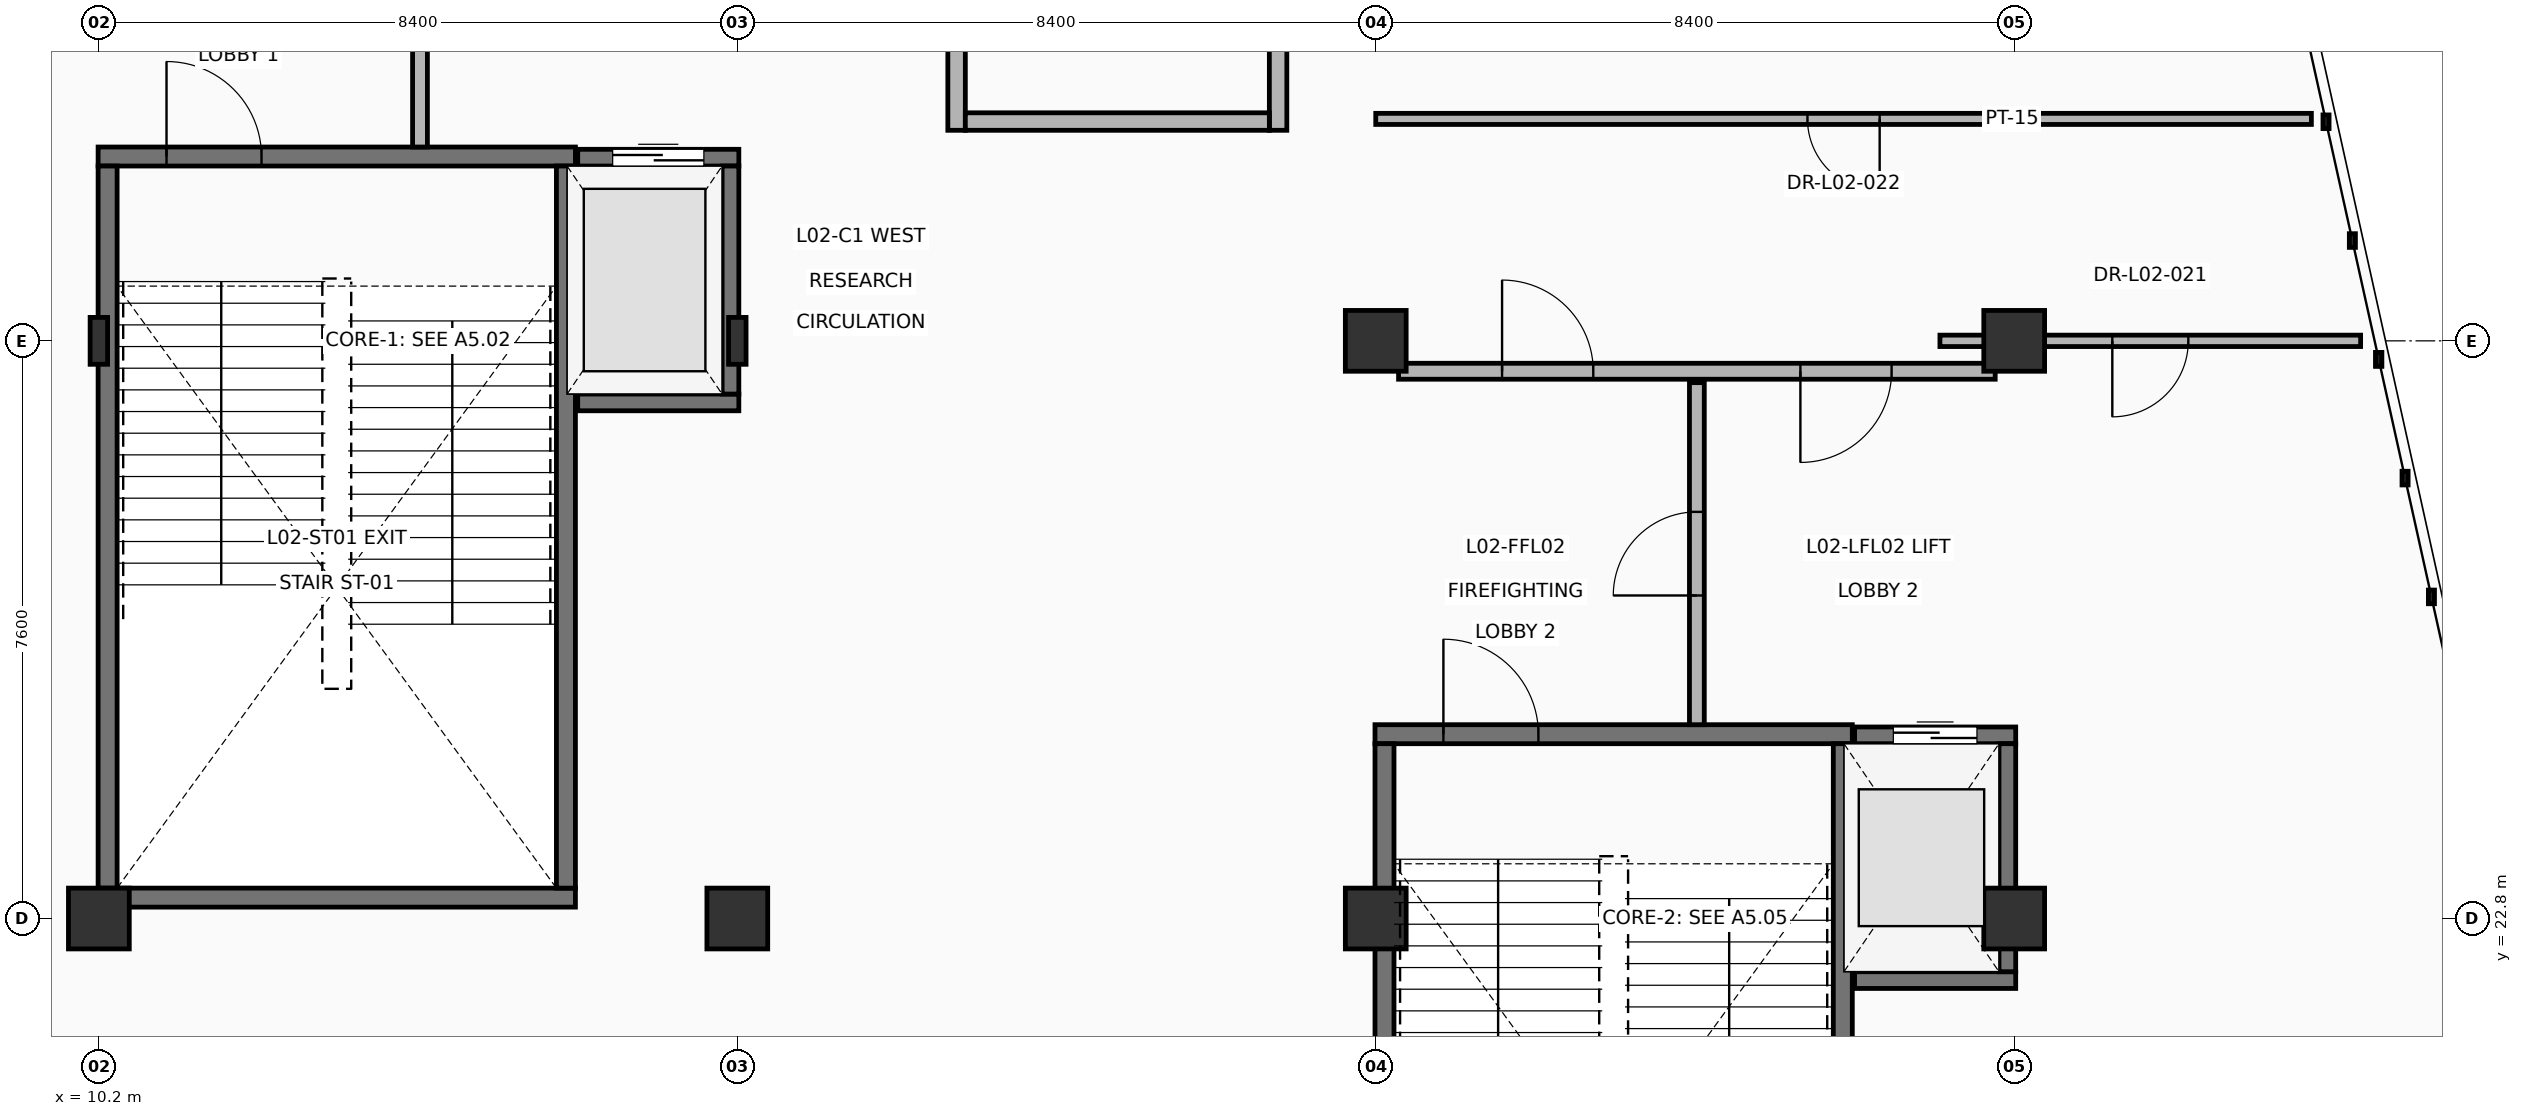
"""IFC4 building model, lengths in metres.
Left out: names, types, materials, properties, quantities, classifications, styles, units other than length and angle.
Written with IfcOpenShell. Run it as: python <this file> out.ifc"""

import sys

from ifc_helpers import new_model, si_unit, direction, frame, frame_2d, origin, origin_2d, place, context, subcontext, project, spatial, rectangle, i_section, extrude, element, fill, save


model = new_model("IFC4")
c1 = context("Model", 3, precision=1e-05, world=origin(), true_north=direction((0.0, 1.0)))
c2 = subcontext(c1, "Body", "Model", "MODEL_VIEW")
j1 = project(units=[si_unit("LENGTHUNIT", "METRE"), si_unit("PLANEANGLEUNIT", "RADIAN")], contexts=[c1])
p1 = place(None, origin())
s1 = spatial("IfcSite", under=j1, at=p1, CompositionType="ELEMENT")
p2 = place(p1, origin())
s2 = spatial("IfcBuilding", under=s1, at=p2, CompositionType="ELEMENT")
p3 = place(p2, frame((0.0, 0.0, 5.4)))
s3 = spatial("IfcBuildingStorey", under=s2, at=p3, CompositionType="ELEMENT", Elevation=5.4)
p4 = place(p3, frame((10.2, 22.8, 0.0), z_axis=(0.0, 0.0, 1.0), x_axis=(1.0, 0.0, 0.0)))
e1 = element("IfcColumn", 1, at=p4, inside=s3, PredefinedType="COLUMN", context=c2, shape_type="SweptSolid", body=[
    extrude(rectangle(XDim=0.8, YDim=0.8, at=origin_2d()), origin(), (0.0, 0.0, 1.0), 5.1),
])
p5 = place(p3, frame((10.2, 30.4, 0.0), z_axis=(0.0, 0.0, 1.0), x_axis=(1.0, 0.0, 0.0)))
e2 = element("IfcColumn", 2, at=p5, inside=s3, PredefinedType="COLUMN", context=c2, shape_type="SweptSolid", body=[
    extrude(i_section(OverallWidth=0.23, OverallDepth=0.617, WebThickness=0.013, FlangeThickness=0.022, at=origin_2d()), origin(), (0.0, 0.0, 1.0), 5.1),
])
p6 = place(p3, frame((18.6, 22.8, 0.0), z_axis=(0.0, 0.0, 1.0), x_axis=(1.0, 0.0, 0.0)))
e3 = element("IfcColumn", 3, at=p6, inside=s3, PredefinedType="COLUMN", context=c2, shape_type="SweptSolid", body=[
    extrude(rectangle(XDim=0.8, YDim=0.8, at=origin_2d()), origin(), (0.0, 0.0, 1.0), 5.1),
])
p7 = place(p3, frame((18.6, 30.4, 0.0), z_axis=(0.0, 0.0, 1.0), x_axis=(1.0, 0.0, 0.0)))
e4 = element("IfcColumn", 4, at=p7, inside=s3, PredefinedType="COLUMN", context=c2, shape_type="SweptSolid", body=[
    extrude(i_section(OverallWidth=0.23, OverallDepth=0.617, WebThickness=0.013, FlangeThickness=0.022, at=origin_2d()), origin(), (0.0, 0.0, 1.0), 5.1),
])
for number, where, z_axis, x_axis in (
    (5, (27.0, 22.8, 0.0), (0.0, 0.0, 1.0), (1.0, 0.0, 0.0)),
    (6, (27.0, 30.4, 0.0), (0.0, 0.0, 1.0), (1.0, 0.0, 0.0)),
    (7, (35.4, 22.8, 0.0), (0.0, 0.0, 1.0), (1.0, 0.0, 0.0)),
    (8, (35.4, 30.4, 0.0), (0.0, 0.0, 1.0), (1.0, 0.0, 0.0)),
):
    element("IfcColumn", number, at=place(p3, frame(where, z_axis=z_axis, x_axis=x_axis)), inside=s3, PredefinedType="COLUMN", context=c2, shape_type="SweptSolid", body=[
        extrude(rectangle(XDim=0.8, YDim=0.8, at=origin_2d()), origin(), (0.0, 0.0, 1.0), 5.1),
    ])
p8 = place(p3, frame((10.19, 23.075, 0.0), z_axis=(0.0, 0.0, 1.0), x_axis=(1.0, 0.0, 0.0)))
e9 = element("IfcWall", 9, at=p8, inside=s3, PredefinedType="SHEAR", context=c2, shape_type="SweptSolid", body=[
    extrude(rectangle(XDim=6.28, YDim=0.25, at=frame_2d((3.14, 0.0))), origin(), (0.0, 0.0, 1.0), 4.86),
])
p9 = place(p3, frame((10.19, 32.825, 0.0), z_axis=(0.0, 0.0, 1.0), x_axis=(1.0, 0.0, 0.0)))
e10 = element("IfcWall", 10, at=p9, inside=s3, PredefinedType="SHEAR", context=c2, shape_type="SweptSolid", body=[
    extrude(rectangle(XDim=6.28, YDim=0.25, at=frame_2d((3.14, 0.0))), origin(), (0.0, 0.0, 1.0), 4.86),
])
p10 = place(p9, frame((0.9, 0.0, 0.0)))
e11 = element("IfcOpeningElement", 11, at=p10, cuts=e10, PredefinedType="OPENING", context=c2, shape_type="SweptSolid", body=[
    extrude(rectangle(XDim=1.25, YDim=2.2, at=frame_2d((0.625, 1.1))), frame((0.0, 0.135, 0.0), z_axis=(0.0, -1.0, 0.0), x_axis=(1.0, 0.0, 0.0)), (0.0, 0.0, 1.0), 0.27),
])
for number, where, z_axis, x_axis in (
    (12, (10.315, 23.2, 0.0), (0.0, 0.0, 1.0), (0.0, 1.0, 0.0)),
    (13, (16.345, 23.2, 0.0), (0.0, 0.0, 1.0), (0.0, 1.0, 0.0)),
):
    element("IfcWall", number, at=place(p3, frame(where, z_axis=z_axis, x_axis=x_axis)), inside=s3, PredefinedType="SHEAR", context=c2, shape_type="SweptSolid", body=[
        extrude(rectangle(XDim=9.5, YDim=0.25, at=frame_2d((4.75, 0.0))), origin(), (0.0, 0.0, 1.0), 4.86),
    ])
p11 = place(p3, frame((16.5, 29.59, 0.0), z_axis=(0.0, 0.0, 1.0), x_axis=(1.0, 0.0, 0.0)))
e14 = element("IfcWall", 14, at=p11, inside=s3, PredefinedType="SHEAR", context=c2, shape_type="SweptSolid", body=[
    extrude(rectangle(XDim=2.12, YDim=0.22, at=frame_2d((1.06, 0.0))), origin(), (0.0, 0.0, 1.0), 4.86),
])
p12 = place(p3, frame((16.5, 32.81, 0.0), z_axis=(0.0, 0.0, 1.0), x_axis=(1.0, 0.0, 0.0)))
e15 = element("IfcWall", 15, at=p12, inside=s3, PredefinedType="SHEAR", context=c2, shape_type="SweptSolid", body=[
    extrude(rectangle(XDim=2.12, YDim=0.22, at=frame_2d((1.06, 0.0))), origin(), (0.0, 0.0, 1.0), 4.86),
])
p13 = place(p12, frame((0.46, 0.0, 0.0)))
e16 = element("IfcOpeningElement", 16, at=p13, cuts=e15, PredefinedType="OPENING", context=c2, shape_type="SweptSolid", body=[
    extrude(rectangle(XDim=1.2, YDim=2.2, at=frame_2d((0.6, 1.1))), frame((0.0, 0.12, 0.0), z_axis=(0.0, -1.0, 0.0), x_axis=(1.0, 0.0, 0.0)), (0.0, 0.0, 1.0), 0.24),
])
p14 = place(p3, frame((18.51, 29.7, 0.0), z_axis=(0.0, 0.0, 1.0), x_axis=(0.0, 1.0, 0.0)))
e17 = element("IfcWall", 17, at=p14, inside=s3, PredefinedType="SHEAR", context=c2, shape_type="SweptSolid", body=[
    extrude(rectangle(XDim=3.0, YDim=0.22, at=frame_2d((1.5, 0.0))), origin(), (0.0, 0.0, 1.0), 4.86),
])
p15 = place(p3, frame((14.425, 32.95, 0.0), z_axis=(0.0, 0.0, 1.0), x_axis=(0.0, 1.0, 0.0)))
e18 = element("IfcWall", 18, at=p15, inside=s3, PredefinedType="PARTITIONING", context=c2, shape_type="SweptSolid", body=[
    extrude(rectangle(XDim=4.5, YDim=0.195, at=frame_2d((2.25, 0.0))), origin(), (0.0, 0.0, 1.0), 4.86),
])
p16 = place(p15, frame((1.7, 0.0, 0.0)))
e19 = element("IfcOpeningElement", 19, at=p16, cuts=e18, PredefinedType="OPENING", context=c2, shape_type="SweptSolid", body=[
    extrude(rectangle(XDim=1.1, YDim=2.15, at=frame_2d((0.55, 1.075))), frame((0.0, 0.107, 0.0), z_axis=(0.0, -1.0, 0.0), x_axis=(1.0, 0.0, 0.0)), (0.0, 0.0, 1.0), 0.215),
])
p17 = place(p3, frame((26.99, 25.225, 0.0), z_axis=(0.0, 0.0, 1.0), x_axis=(1.0, 0.0, 0.0)))
e20 = element("IfcWall", 20, at=p17, inside=s3, PredefinedType="SHEAR", context=c2, shape_type="SweptSolid", body=[
    extrude(rectangle(XDim=6.28, YDim=0.25, at=frame_2d((3.14, 0.0))), origin(), (0.0, 0.0, 1.0), 4.86),
])
p18 = place(p17, frame((0.9, 0.0, 0.0)))
e21 = element("IfcOpeningElement", 21, at=p18, cuts=e20, PredefinedType="OPENING", context=c2, shape_type="SweptSolid", body=[
    extrude(rectangle(XDim=1.25, YDim=2.2, at=frame_2d((0.625, 1.1))), frame((0.0, 0.135, 0.0), z_axis=(0.0, -1.0, 0.0), x_axis=(1.0, 0.0, 0.0)), (0.0, 0.0, 1.0), 0.27),
])
for number, where, z_axis, x_axis in (
    (22, (27.115, 15.6, 0.0), (0.0, 0.0, 1.0), (0.0, 1.0, 0.0)),
    (23, (33.145, 15.6, 0.0), (0.0, 0.0, 1.0), (0.0, 1.0, 0.0)),
):
    element("IfcWall", number, at=place(p3, frame(where, z_axis=z_axis, x_axis=x_axis)), inside=s3, PredefinedType="SHEAR", context=c2, shape_type="SweptSolid", body=[
        extrude(rectangle(XDim=9.5, YDim=0.25, at=frame_2d((4.75, 0.0))), origin(), (0.0, 0.0, 1.0), 4.86),
    ])
p19 = place(p3, frame((33.3, 21.99, 0.0), z_axis=(0.0, 0.0, 1.0), x_axis=(1.0, 0.0, 0.0)))
e24 = element("IfcWall", 24, at=p19, inside=s3, PredefinedType="SHEAR", context=c2, shape_type="SweptSolid", body=[
    extrude(rectangle(XDim=2.12, YDim=0.22, at=frame_2d((1.06, 0.0))), origin(), (0.0, 0.0, 1.0), 4.86),
])
p20 = place(p3, frame((33.3, 25.21, 0.0), z_axis=(0.0, 0.0, 1.0), x_axis=(1.0, 0.0, 0.0)))
e25 = element("IfcWall", 25, at=p20, inside=s3, PredefinedType="SHEAR", context=c2, shape_type="SweptSolid", body=[
    extrude(rectangle(XDim=2.12, YDim=0.22, at=frame_2d((1.06, 0.0))), origin(), (0.0, 0.0, 1.0), 4.86),
])
p21 = place(p20, frame((0.51, 0.0, 0.0)))
e26 = element("IfcOpeningElement", 26, at=p21, cuts=e25, PredefinedType="OPENING", context=c2, shape_type="SweptSolid", body=[
    extrude(rectangle(XDim=1.1, YDim=2.15, at=frame_2d((0.55, 1.075))), frame((0.0, 0.12, 0.0), z_axis=(0.0, -1.0, 0.0), x_axis=(1.0, 0.0, 0.0)), (0.0, 0.0, 1.0), 0.24),
])
p22 = place(p3, frame((35.31, 22.1, 0.0), z_axis=(0.0, 0.0, 1.0), x_axis=(0.0, 1.0, 0.0)))
e27 = element("IfcWall", 27, at=p22, inside=s3, PredefinedType="SHEAR", context=c2, shape_type="SweptSolid", body=[
    extrude(rectangle(XDim=3.0, YDim=0.22, at=frame_2d((1.5, 0.0))), origin(), (0.0, 0.0, 1.0), 4.86),
])
p23 = place(p3, frame((27.3, 30.0, 0.0), z_axis=(0.0, 0.0, 1.0), x_axis=(1.0, 0.0, 0.0)))
e28 = element("IfcWall", 28, at=p23, inside=s3, PredefinedType="PARTITIONING", context=c2, shape_type="SweptSolid", body=[
    extrude(rectangle(XDim=7.85, YDim=0.21, at=frame_2d((3.925, 0.0))), origin(), (0.0, 0.0, 1.0), 4.86),
])
p24 = place(p23, frame((1.362, 0.0, 0.0)))
e29 = element("IfcOpeningElement", 29, at=p24, cuts=e28, PredefinedType="OPENING", context=c2, shape_type="SweptSolid", body=[
    extrude(rectangle(XDim=1.2, YDim=2.2, at=frame_2d((0.6, 1.1))), frame((0.0, 0.115, 0.0), z_axis=(0.0, -1.0, 0.0), x_axis=(1.0, 0.0, 0.0)), (0.0, 0.0, 1.0), 0.23),
])
p25 = place(p23, frame((5.287, 0.0, 0.0)))
e30 = element("IfcOpeningElement", 30, at=p25, cuts=e28, PredefinedType="OPENING", context=c2, shape_type="SweptSolid", body=[
    extrude(rectangle(XDim=1.2, YDim=2.2, at=frame_2d((0.6, 1.1))), frame((0.0, 0.115, 0.0), z_axis=(0.0, -1.0, 0.0), x_axis=(1.0, 0.0, 0.0)), (0.0, 0.0, 1.0), 0.23),
])
p26 = place(p3, frame((31.225, 25.35, 0.0), z_axis=(0.0, 0.0, 1.0), x_axis=(0.0, 1.0, 0.0)))
e31 = element("IfcWall", 31, at=p26, inside=s3, PredefinedType="PARTITIONING", context=c2, shape_type="SweptSolid", body=[
    extrude(rectangle(XDim=4.5, YDim=0.195, at=frame_2d((2.25, 0.0))), origin(), (0.0, 0.0, 1.0), 4.86),
])
p27 = place(p26, frame((1.7, 0.0, 0.0)))
e32 = element("IfcOpeningElement", 32, at=p27, cuts=e31, PredefinedType="OPENING", context=c2, shape_type="SweptSolid", body=[
    extrude(rectangle(XDim=1.1, YDim=2.15, at=frame_2d((0.55, 1.075))), frame((0.0, 0.107, 0.0), z_axis=(0.0, -1.0, 0.0), x_axis=(1.0, 0.0, 0.0)), (0.0, 0.0, 1.0), 0.215),
])
p28 = place(p3, frame((21.485, 33.17, 0.0), z_axis=(0.0, 0.0, 1.0), x_axis=(0.0, 1.0, 0.0)))
e33 = element("IfcWall", 33, at=p28, inside=s3, PredefinedType="PLUMBINGWALL", context=c2, shape_type="SweptSolid", body=[
    extrude(rectangle(XDim=4.46, YDim=0.23, at=frame_2d((2.23, 0.0))), origin(), (0.0, 0.0, 1.0), 4.86),
])
p29 = place(p28, frame((1.755, 0.0, 0.0)))
e34 = element("IfcOpeningElement", 34, at=p29, cuts=e33, PredefinedType="OPENING", context=c2, shape_type="SweptSolid", body=[
    extrude(rectangle(XDim=0.95, YDim=2.1, at=frame_2d((0.475, 1.05))), frame((0.0, 0.125, 0.0), z_axis=(0.0, -1.0, 0.0), x_axis=(1.0, 0.0, 0.0)), (0.0, 0.0, 1.0), 0.25),
])
p30 = place(p3, frame((25.715, 33.17, 0.0), z_axis=(0.0, 0.0, 1.0), x_axis=(0.0, 1.0, 0.0)))
e35 = element("IfcWall", 35, at=p30, inside=s3, PredefinedType="PLUMBINGWALL", context=c2, shape_type="SweptSolid", body=[
    extrude(rectangle(XDim=4.46, YDim=0.23, at=frame_2d((2.23, 0.0))), origin(), (0.0, 0.0, 1.0), 4.86),
])
p31 = place(p3, frame((21.6, 33.285, 0.0), z_axis=(0.0, 0.0, 1.0), x_axis=(1.0, 0.0, 0.0)))
e36 = element("IfcWall", 36, at=p31, inside=s3, PredefinedType="PLUMBINGWALL", context=c2, shape_type="SweptSolid", body=[
    extrude(rectangle(XDim=4.0, YDim=0.23, at=frame_2d((2.0, 0.0))), origin(), (0.0, 0.0, 1.0), 4.608),
])
p32 = place(p3, frame((34.423, 30.4, 0.0), z_axis=(0.0, 0.0, 1.0), x_axis=(1.0, 0.0, 0.0)))
e37 = element("IfcWall", 37, at=p32, inside=s3, PredefinedType="PARTITIONING", context=c2, shape_type="SweptSolid", body=[
    extrude(rectangle(XDim=5.535, YDim=0.15, at=frame_2d((2.768, 0.0))), origin(), (0.0, 0.0, 1.0), 4.162),
])
p33 = place(p32, frame((2.268, 0.0, 0.0)))
e38 = element("IfcOpeningElement", 38, at=p33, cuts=e37, PredefinedType="OPENING", context=c2, shape_type="SweptSolid", body=[
    extrude(rectangle(XDim=1.0, YDim=2.15, at=frame_2d((0.5, 1.075))), frame((0.0, 0.085, 0.0), z_axis=(0.0, -1.0, 0.0), x_axis=(1.0, 0.0, 0.0)), (0.0, 0.0, 1.0), 0.17),
])
p34 = place(p3, frame((39.31, 33.32, 0.0), z_axis=(0.0, 0.0, 1.0), x_axis=(-1.0, 0.0, 0.0)))
e39 = element("IfcWall", 39, at=p34, inside=s3, PredefinedType="PARTITIONING", context=c2, shape_type="SweptSolid", body=[
    extrude(rectangle(XDim=12.31, YDim=0.146, at=frame_2d((6.155, 0.0))), origin(), (0.0, 0.0, 1.0), 4.238),
])
p35 = place(p34, frame((5.68, 0.0, 0.0)))
e40 = element("IfcOpeningElement", 40, at=p35, cuts=e39, PredefinedType="OPENING", context=c2, shape_type="SweptSolid", body=[
    extrude(rectangle(XDim=0.95, YDim=2.1, at=frame_2d((0.475, 1.05))), frame((0.0, 0.083, 0.0), z_axis=(0.0, -1.0, 0.0), x_axis=(1.0, 0.0, 0.0)), (0.0, 0.0, 1.0), 0.166),
])
p36 = place(p10, origin())
e41 = element("IfcDoor", 41, at=p36, inside=s3, OperationType="SINGLE_SWING_LEFT", PredefinedType="DOOR", context=c2, shape_type="SweptSolid", body=[
    extrude(rectangle(XDim=1.25, YDim=2.2, at=frame_2d((0.625, 1.1))), frame((0.0, 0.025, 0.0), z_axis=(0.0, -1.0, 0.0), x_axis=(1.0, 0.0, 0.0)), (0.0, 0.0, 1.0), 0.05),
])
fill(e11, e41)
p37 = place(p13, origin())
e42 = element("IfcDoor", 42, at=p37, inside=s3, OperationType="DOUBLE_DOOR_SLIDING", PredefinedType="DOOR", context=c2, shape_type="SweptSolid", body=[
    extrude(rectangle(XDim=1.2, YDim=2.2, at=frame_2d((0.6, 1.1))), frame((0.0, 0.025, 0.0), z_axis=(0.0, -1.0, 0.0), x_axis=(1.0, 0.0, 0.0)), (0.0, 0.0, 1.0), 0.05),
])
fill(e16, e42)
p38 = place(p18, origin())
e43 = element("IfcDoor", 43, at=p38, inside=s3, OperationType="SINGLE_SWING_LEFT", PredefinedType="DOOR", context=c2, shape_type="SweptSolid", body=[
    extrude(rectangle(XDim=1.25, YDim=2.2, at=frame_2d((0.625, 1.1))), frame((0.0, 0.025, 0.0), z_axis=(0.0, -1.0, 0.0), x_axis=(1.0, 0.0, 0.0)), (0.0, 0.0, 1.0), 0.05),
])
fill(e21, e43)
p39 = place(p21, origin())
e44 = element("IfcDoor", 44, at=p39, inside=s3, OperationType="DOUBLE_DOOR_SLIDING", PredefinedType="DOOR", context=c2, shape_type="SweptSolid", body=[
    extrude(rectangle(XDim=1.1, YDim=2.15, at=frame_2d((0.55, 1.075))), frame((0.0, 0.025, 0.0), z_axis=(0.0, -1.0, 0.0), x_axis=(1.0, 0.0, 0.0)), (0.0, 0.0, 1.0), 0.05),
])
fill(e26, e44)
p40 = place(p24, origin())
e45 = element("IfcDoor", 45, at=p40, inside=s3, OperationType="SINGLE_SWING_LEFT", PredefinedType="DOOR", context=c2, shape_type="SweptSolid", body=[
    extrude(rectangle(XDim=1.2, YDim=2.2, at=frame_2d((0.6, 1.1))), frame((0.0, 0.025, 0.0), z_axis=(0.0, -1.0, 0.0), x_axis=(1.0, 0.0, 0.0)), (0.0, 0.0, 1.0), 0.05),
])
fill(e29, e45)
p41 = place(p25, origin())
e46 = element("IfcDoor", 46, at=p41, inside=s3, OperationType="SINGLE_SWING_RIGHT", PredefinedType="DOOR", context=c2, shape_type="SweptSolid", body=[
    extrude(rectangle(XDim=1.2, YDim=2.2, at=frame_2d((0.6, 1.1))), frame((0.0, 0.025, 0.0), z_axis=(0.0, -1.0, 0.0), x_axis=(1.0, 0.0, 0.0)), (0.0, 0.0, 1.0), 0.05),
])
fill(e30, e46)
p42 = place(p27, origin())
e47 = element("IfcDoor", 47, at=p42, inside=s3, OperationType="SINGLE_SWING_LEFT", PredefinedType="DOOR", context=c2, shape_type="SweptSolid", body=[
    extrude(rectangle(XDim=1.1, YDim=2.15, at=frame_2d((0.55, 1.075))), frame((0.0, 0.025, 0.0), z_axis=(0.0, -1.0, 0.0), x_axis=(1.0, 0.0, 0.0)), (0.0, 0.0, 1.0), 0.05),
])
fill(e32, e47)
p43 = place(p33, origin())
e48 = element("IfcDoor", 48, at=p43, inside=s3, OperationType="SINGLE_SWING_RIGHT", PredefinedType="DOOR", context=c2, shape_type="SweptSolid", body=[
    extrude(rectangle(XDim=1.0, YDim=2.15, at=frame_2d((0.5, 1.075))), frame((0.0, 0.025, 0.0), z_axis=(0.0, -1.0, 0.0), x_axis=(1.0, 0.0, 0.0)), (0.0, 0.0, 1.0), 0.05),
])
fill(e38, e48)
p44 = place(p35, origin())
e49 = element("IfcDoor", 49, at=p44, inside=s3, OperationType="SINGLE_SWING_LEFT", PredefinedType="DOOR", context=c2, shape_type="SweptSolid", body=[
    extrude(rectangle(XDim=0.95, YDim=2.1, at=frame_2d((0.475, 1.05))), frame((0.0, 0.025, 0.0), z_axis=(0.0, -1.0, 0.0), x_axis=(1.0, 0.0, 0.0)), (0.0, 0.0, 1.0), 0.05),
])
fill(e40, e49)
save(model, sys.argv[1])
